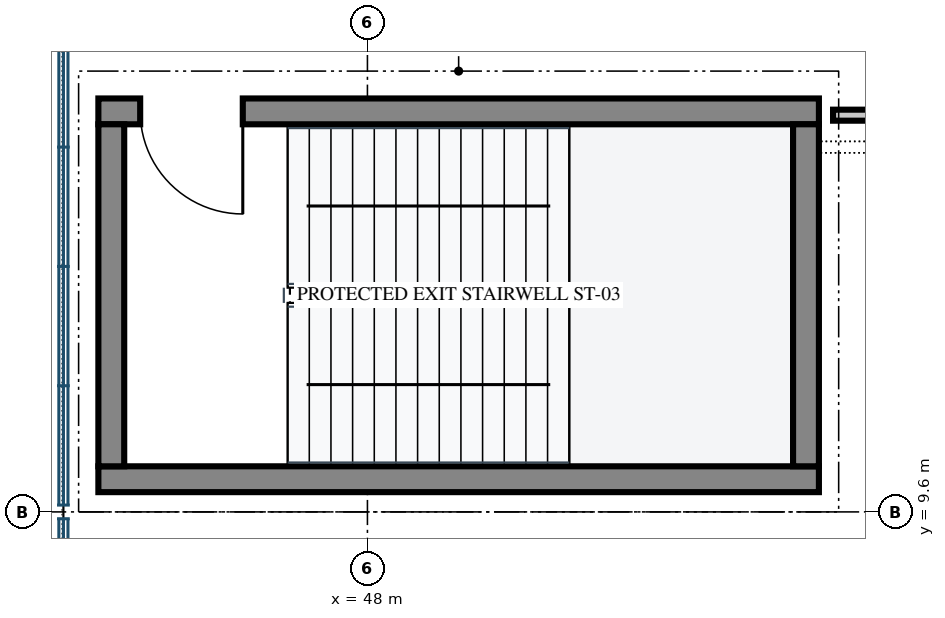
"""IFC4 building model, lengths in metres.
Left out: names, types, materials, properties, quantities, classifications, styles, units other than length and angle.
Written with IfcOpenShell. Run it as: python <this file> out.ifc"""

import sys

from ifc_helpers import new_model, si_unit, direction, frame, frame_2d, origin, place, context, subcontext, project, spatial, rectangle, extrude, element, fill, save


model = new_model("IFC4")
c1 = context("Model", 3, precision=1e-05, world=origin(), true_north=direction((0.0, 1.0)))
c2 = subcontext(c1, "Body", "Model", "MODEL_VIEW")
j1 = project(units=[si_unit("LENGTHUNIT", "METRE"), si_unit("PLANEANGLEUNIT", "RADIAN")], contexts=[c1])
p1 = place(None, origin())
s1 = spatial("IfcSite", under=j1, at=p1, CompositionType="ELEMENT")
p2 = place(p1, origin())
s2 = spatial("IfcBuilding", under=s1, at=p2, CompositionType="ELEMENT")
p3 = place(p2, frame((0.0, 0.0, 15.0)))
s3 = spatial("IfcBuildingStorey", under=s2, at=p3, CompositionType="ELEMENT", Elevation=15.0)
p4 = place(p3, frame((44.46, 10.03, 0.0), z_axis=(0.0, 0.0, 1.0), x_axis=(1.0, 0.0, 0.0)))
e1 = element("IfcWall", 1, at=p4, inside=s3, PredefinedType="SHEAR", context=c2, shape_type="SweptSolid", body=[
    extrude(rectangle(XDim=9.48, YDim=0.34, at=frame_2d((4.74, 0.0))), origin(), (0.0, 0.0, 1.0), 4.52),
])
p5 = place(p3, frame((44.46, 14.87, 0.0), z_axis=(0.0, 0.0, 1.0), x_axis=(1.0, 0.0, 0.0)))
e2 = element("IfcWall", 2, at=p5, inside=s3, PredefinedType="SHEAR", context=c2, shape_type="SweptSolid", body=[
    extrude(rectangle(XDim=9.48, YDim=0.34, at=frame_2d((4.74, 0.0))), origin(), (0.0, 0.0, 1.0), 4.52),
])
p6 = place(p5, frame((0.55, 0.0, 0.0)))
e3 = element("IfcOpeningElement", 3, at=p6, cuts=e2, PredefinedType="OPENING", context=c2, shape_type="SweptSolid", body=[
    extrude(rectangle(XDim=1.35, YDim=2.2, at=frame_2d((0.675, 1.1))), frame((0.0, 0.182, 0.0), z_axis=(0.0, -1.0, 0.0), x_axis=(1.0, 0.0, 0.0)), (0.0, 0.0, 1.0), 0.364),
])
for number, where, z_axis, x_axis in (
    (4, (53.77, 10.2, 0.0), (0.0, 0.0, 1.0), (0.0, 1.0, 0.0)),
    (5, (44.63, 10.2, 0.0), (0.0, 0.0, 1.0), (0.0, 1.0, 0.0)),
):
    element("IfcWall", number, at=place(p3, frame(where, z_axis=z_axis, x_axis=x_axis)), inside=s3, PredefinedType="SHEAR", context=c2, shape_type="SweptSolid", body=[
        extrude(rectangle(XDim=4.5, YDim=0.34, at=frame_2d((2.25, 0.0))), origin(), (0.0, 0.0, 1.0), 4.52),
    ])
p7 = place(p3, frame((54.126, 14.82, 0.0), z_axis=(0.0, 0.0, 1.0), x_axis=(1.0, 0.0, 0.0)))
e6 = element("IfcWall", 6, at=p7, inside=s3, PredefinedType="PARTITIONING", context=c2, shape_type="SweptSolid", body=[
    extrude(rectangle(XDim=2.634, YDim=0.145, at=frame_2d((1.317, 0.0))), origin(), (0.0, 0.0, 1.0), 4.52),
])
p8 = place(p7, frame((0.857, 0.0, 0.0)))
e7 = element("IfcOpeningElement", 7, at=p8, cuts=e6, PredefinedType="OPENING", context=c2, shape_type="SweptSolid", body=[
    extrude(rectangle(XDim=0.92, YDim=2.1, at=frame_2d((0.46, 1.05))), frame((0.0, 0.084, 0.0), z_axis=(0.0, -1.0, 0.0), x_axis=(1.0, 0.0, 0.0)), (0.0, 0.0, 1.0), 0.169),
])
p9 = place(p6, frame((1.35, 0.0, 0.0), z_axis=(0.0, 0.0, 1.0), x_axis=(-1.0, 0.0, 0.0)))
e8 = element("IfcDoor", 8, at=p9, inside=s3, OperationType="SINGLE_SWING_LEFT", PredefinedType="DOOR", context=c2, shape_type="SweptSolid", body=[
    extrude(rectangle(XDim=1.35, YDim=2.2, at=frame_2d((0.675, 1.1))), frame((0.0, 0.025, 0.0), z_axis=(0.0, -1.0, 0.0), x_axis=(1.0, 0.0, 0.0)), (0.0, 0.0, 1.0), 0.05),
])
fill(e3, e8)
save(model, sys.argv[1])
